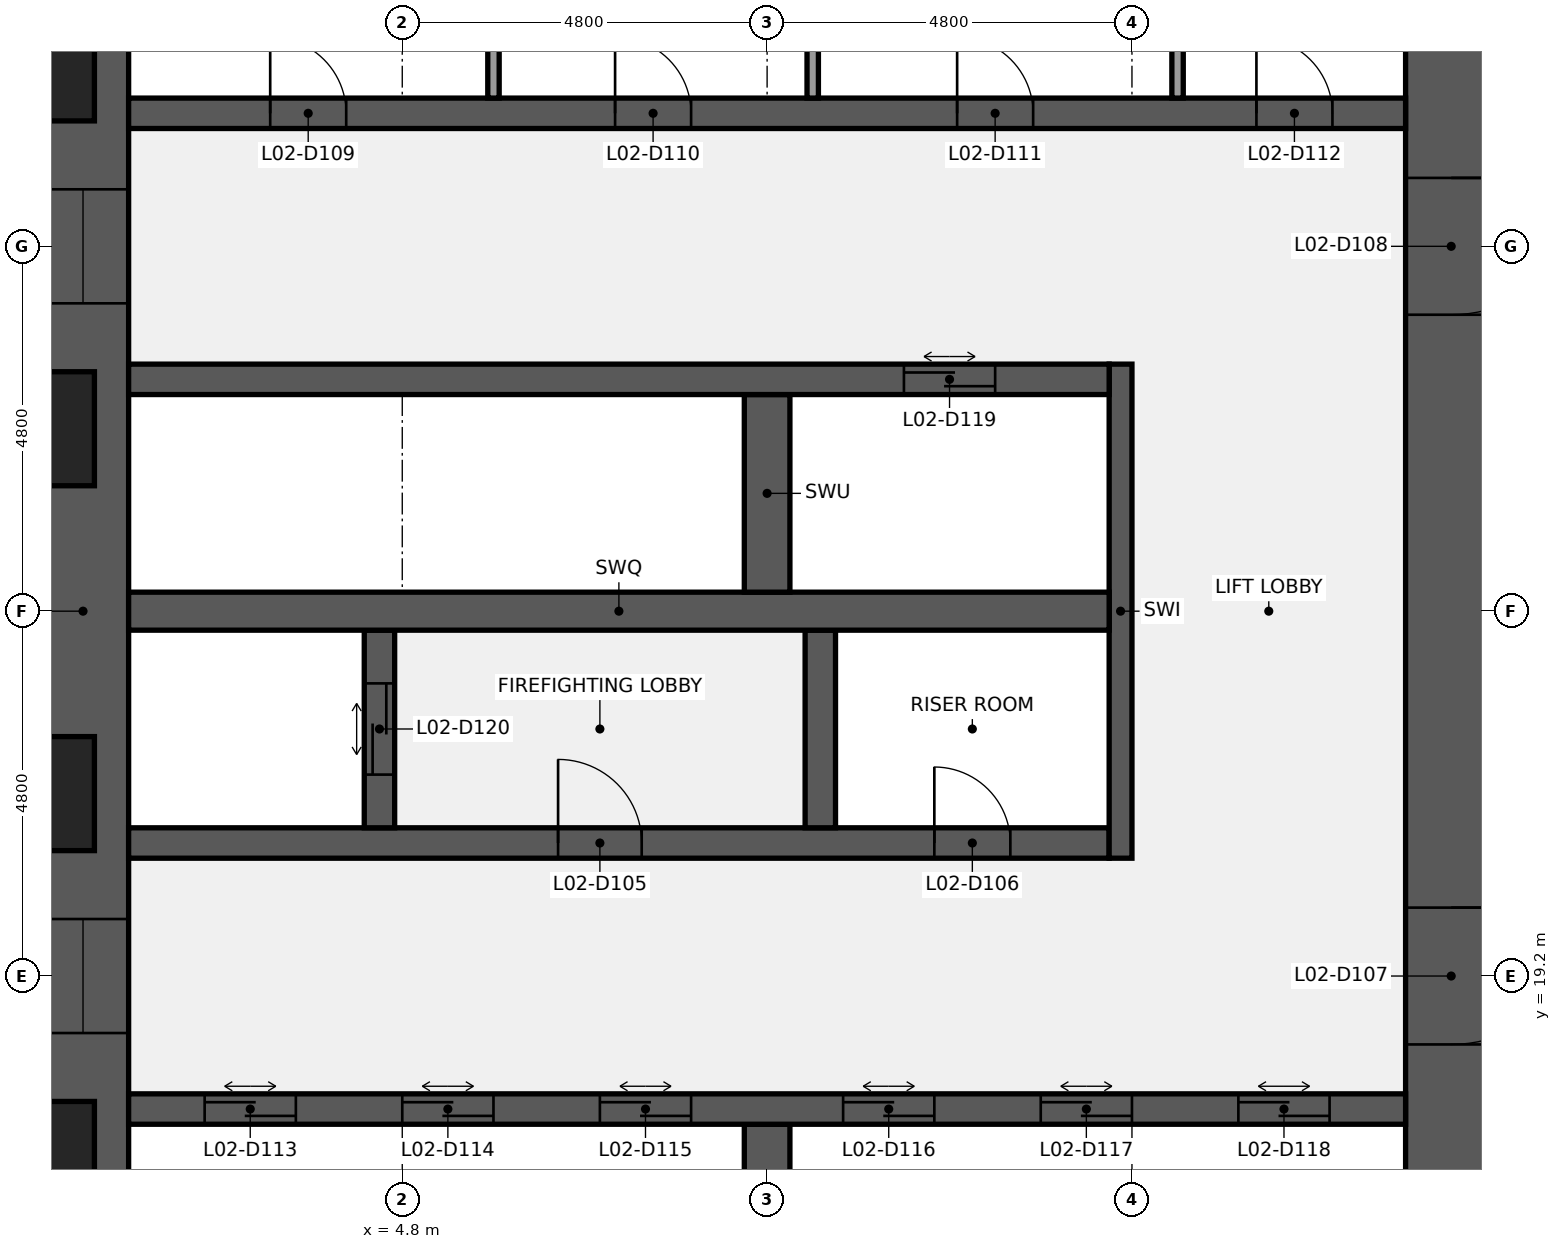
"""IFC4 building model, lengths in metres.
Left out: names, types, materials, properties, quantities, classifications, styles, units other than length and angle.
Written with IfcOpenShell. Run it as: python <this file> out.ifc"""

import sys

from ifc_helpers import new_model, si_unit, direction, frame, frame_2d, origin, place, context, subcontext, project, spatial, rectangle, extrude, element, fill, save


model = new_model("IFC4")
c1 = context("Model", 3, precision=1e-05, world=origin(), true_north=direction((0.0, 1.0)))
c2 = subcontext(c1, "Body", "Model", "MODEL_VIEW")
j1 = project(units=[si_unit("LENGTHUNIT", "METRE"), si_unit("PLANEANGLEUNIT", "RADIAN")], contexts=[c1])
p1 = place(None, origin())
s1 = spatial("IfcSite", under=j1, at=p1, CompositionType="ELEMENT")
p2 = place(p1, origin())
s2 = spatial("IfcBuilding", under=s1, at=p2, CompositionType="ELEMENT")
p3 = place(p2, frame((0.0, 0.0, 17.0)))
s3 = spatial("IfcBuildingStorey", under=s2, at=p3, CompositionType="ELEMENT", Elevation=17.0)
p4 = place(p3, frame((0.6, 9.6, 0.0), z_axis=(0.0, 0.0, 1.0), x_axis=(0.0, 1.0, 0.0)))
e1 = element("IfcWall", 1, at=p4, inside=s3, PredefinedType="SHEAR", context=c2, shape_type="SweptSolid", body=[
    extrude(rectangle(XDim=28.8, YDim=1.2, at=frame_2d((14.4, 0.0))), origin(), (0.0, 0.0, 1.0), 4.24),
])
p5 = place(p4, frame((8.85, 0.0, 0.9)))
e2 = element("IfcOpeningElement", 2, at=p5, cuts=e1, PredefinedType="OPENING", context=c2, shape_type="SweptSolid", body=[
    extrude(rectangle(XDim=1.5, YDim=1.5, at=frame_2d((0.75, 0.75))), frame((0.0, 0.61, 0.0), z_axis=(0.0, -1.0, 0.0), x_axis=(1.0, 0.0, 0.0)), (0.0, 0.0, 1.0), 1.22),
])
p6 = place(p4, frame((18.45, 0.0, 0.9)))
e3 = element("IfcOpeningElement", 3, at=p6, cuts=e1, PredefinedType="OPENING", context=c2, shape_type="SweptSolid", body=[
    extrude(rectangle(XDim=1.5, YDim=1.5, at=frame_2d((0.75, 0.75))), frame((0.0, 0.61, 0.0), z_axis=(0.0, -1.0, 0.0), x_axis=(1.0, 0.0, 0.0)), (0.0, 0.0, 1.0), 1.22),
])
p7 = place(p3, frame((18.6, 38.4, 0.0), z_axis=(0.0, 0.0, 1.0), x_axis=(0.0, -1.0, 0.0)))
e4 = element("IfcWall", 4, at=p7, inside=s3, PredefinedType="SHEAR", context=c2, shape_type="SweptSolid", body=[
    extrude(rectangle(XDim=28.8, YDim=1.2, at=frame_2d((14.4, 0.0))), origin(), (0.0, 0.0, 1.0), 4.24),
])
p8 = place(p7, frame((18.3, 0.0, 0.0)))
e5 = element("IfcOpeningElement", 5, at=p8, cuts=e4, PredefinedType="OPENING", context=c2, shape_type="SweptSolid", body=[
    extrude(rectangle(XDim=1.8, YDim=2.1, at=frame_2d((0.9, 1.05))), frame((0.0, 0.61, 0.0), z_axis=(0.0, -1.0, 0.0), x_axis=(1.0, 0.0, 0.0)), (0.0, 0.0, 1.0), 1.22),
])
p9 = place(p7, frame((8.7, 0.0, 0.0)))
e6 = element("IfcOpeningElement", 6, at=p9, cuts=e4, PredefinedType="OPENING", context=c2, shape_type="SweptSolid", body=[
    extrude(rectangle(XDim=1.8, YDim=2.1, at=frame_2d((0.9, 1.05))), frame((0.0, 0.61, 0.0), z_axis=(0.0, -1.0, 0.0), x_axis=(1.0, 0.0, 0.0)), (0.0, 0.0, 1.0), 1.22),
])
p10 = place(p3, frame((9.6, 14.65, 0.0), z_axis=(0.0, 0.0, 1.0), x_axis=(0.0, 1.0, 0.0)))
e7 = element("IfcWall", 7, at=p10, inside=s3, PredefinedType="SHEAR", context=c2, shape_type="SweptSolid", body=[
    extrude(rectangle(XDim=2.6, YDim=0.6, at=frame_2d((1.3, 0.0))), origin(), (0.0, 0.0, 1.0), 4.24),
])
p11 = place(p3, frame((1.2, 17.45, 0.0), z_axis=(0.0, 0.0, 1.0), x_axis=(1.0, 0.0, 0.0)))
e8 = element("IfcWall", 8, at=p11, inside=s3, PredefinedType="SHEAR", context=c2, shape_type="SweptSolid", body=[
    extrude(rectangle(XDim=16.8, YDim=0.4, at=frame_2d((8.4, 0.0))), origin(), (0.0, 0.0, 1.0), 4.24),
])
p12 = place(p11, frame((1.0, 0.0, 0.0)))
e9 = element("IfcOpeningElement", 9, at=p12, cuts=e8, PredefinedType="OPENING", context=c2, shape_type="SweptSolid", body=[
    extrude(rectangle(XDim=1.2, YDim=2.1, at=frame_2d((0.6, 1.05))), frame((0.0, 0.21, 0.0), z_axis=(0.0, -1.0, 0.0), x_axis=(1.0, 0.0, 0.0)), (0.0, 0.0, 1.0), 0.42),
])
p13 = place(p11, frame((3.6, 0.0, 0.0)))
e10 = element("IfcOpeningElement", 10, at=p13, cuts=e8, PredefinedType="OPENING", context=c2, shape_type="SweptSolid", body=[
    extrude(rectangle(XDim=1.2, YDim=2.1, at=frame_2d((0.6, 1.05))), frame((0.0, 0.21, 0.0), z_axis=(0.0, -1.0, 0.0), x_axis=(1.0, 0.0, 0.0)), (0.0, 0.0, 1.0), 0.42),
])
p14 = place(p11, frame((6.2, 0.0, 0.0)))
e11 = element("IfcOpeningElement", 11, at=p14, cuts=e8, PredefinedType="OPENING", context=c2, shape_type="SweptSolid", body=[
    extrude(rectangle(XDim=1.2, YDim=2.1, at=frame_2d((0.6, 1.05))), frame((0.0, 0.21, 0.0), z_axis=(0.0, -1.0, 0.0), x_axis=(1.0, 0.0, 0.0)), (0.0, 0.0, 1.0), 0.42),
])
p15 = place(p11, frame((9.4, 0.0, 0.0)))
e12 = element("IfcOpeningElement", 12, at=p15, cuts=e8, PredefinedType="OPENING", context=c2, shape_type="SweptSolid", body=[
    extrude(rectangle(XDim=1.2, YDim=2.1, at=frame_2d((0.6, 1.05))), frame((0.0, 0.21, 0.0), z_axis=(0.0, -1.0, 0.0), x_axis=(1.0, 0.0, 0.0)), (0.0, 0.0, 1.0), 0.42),
])
p16 = place(p11, frame((12.0, 0.0, 0.0)))
e13 = element("IfcOpeningElement", 13, at=p16, cuts=e8, PredefinedType="OPENING", context=c2, shape_type="SweptSolid", body=[
    extrude(rectangle(XDim=1.2, YDim=2.1, at=frame_2d((0.6, 1.05))), frame((0.0, 0.21, 0.0), z_axis=(0.0, -1.0, 0.0), x_axis=(1.0, 0.0, 0.0)), (0.0, 0.0, 1.0), 0.42),
])
p17 = place(p11, frame((14.6, 0.0, 0.0)))
e14 = element("IfcOpeningElement", 14, at=p17, cuts=e8, PredefinedType="OPENING", context=c2, shape_type="SweptSolid", body=[
    extrude(rectangle(XDim=1.2, YDim=2.1, at=frame_2d((0.6, 1.05))), frame((0.0, 0.21, 0.0), z_axis=(0.0, -1.0, 0.0), x_axis=(1.0, 0.0, 0.0)), (0.0, 0.0, 1.0), 0.42),
])
p18 = place(p3, frame((1.2, 20.95, 0.0), z_axis=(0.0, 0.0, 1.0), x_axis=(1.0, 0.0, 0.0)))
e15 = element("IfcWall", 15, at=p18, inside=s3, PredefinedType="SHEAR", context=c2, shape_type="SweptSolid", body=[
    extrude(rectangle(XDim=12.9, YDim=0.4, at=frame_2d((6.45, 0.0))), origin(), (0.0, 0.0, 1.0), 4.24),
])
p19 = place(p18, frame((5.65, 0.0, 0.0)))
e16 = element("IfcOpeningElement", 16, at=p19, cuts=e15, PredefinedType="OPENING", context=c2, shape_type="SweptSolid", body=[
    extrude(rectangle(XDim=1.1, YDim=2.1, at=frame_2d((0.55, 1.05))), frame((0.0, 0.21, 0.0), z_axis=(0.0, -1.0, 0.0), x_axis=(1.0, 0.0, 0.0)), (0.0, 0.0, 1.0), 0.42),
])
p20 = place(p18, frame((10.6, 0.0, 0.0)))
e17 = element("IfcOpeningElement", 17, at=p20, cuts=e15, PredefinedType="OPENING", context=c2, shape_type="SweptSolid", body=[
    extrude(rectangle(XDim=1.0, YDim=2.1, at=frame_2d((0.5, 1.05))), frame((0.0, 0.21, 0.0), z_axis=(0.0, -1.0, 0.0), x_axis=(1.0, 0.0, 0.0)), (0.0, 0.0, 1.0), 0.42),
])
p21 = place(p3, frame((14.25, 20.75, 0.0), z_axis=(0.0, 0.0, 1.0), x_axis=(0.0, 1.0, 0.0)))
e18 = element("IfcWall", 18, at=p21, inside=s3, PredefinedType="SHEAR", context=c2, shape_type="SweptSolid", body=[
    extrude(rectangle(XDim=6.5, YDim=0.3, at=frame_2d((3.25, 0.0))), origin(), (0.0, 0.0, 1.0), 4.24),
])
p22 = place(p3, frame((4.5, 21.15, 0.0), z_axis=(0.0, 0.0, 1.0), x_axis=(0.0, 1.0, 0.0)))
e19 = element("IfcWall", 19, at=p22, inside=s3, PredefinedType="SHEAR", context=c2, shape_type="SweptSolid", body=[
    extrude(rectangle(XDim=2.6, YDim=0.4, at=frame_2d((1.3, 0.0))), origin(), (0.0, 0.0, 1.0), 4.24),
])
p23 = place(p22, frame((0.7, 0.0, 0.0)))
e20 = element("IfcOpeningElement", 20, at=p23, cuts=e19, PredefinedType="OPENING", context=c2, shape_type="SweptSolid", body=[
    extrude(rectangle(XDim=1.2, YDim=2.1, at=frame_2d((0.6, 1.05))), frame((0.0, 0.21, 0.0), z_axis=(0.0, -1.0, 0.0), x_axis=(1.0, 0.0, 0.0)), (0.0, 0.0, 1.0), 0.42),
])
p24 = place(p3, frame((10.3, 21.15, 0.0), z_axis=(0.0, 0.0, 1.0), x_axis=(0.0, 1.0, 0.0)))
e21 = element("IfcWall", 21, at=p24, inside=s3, PredefinedType="SHEAR", context=c2, shape_type="SweptSolid", body=[
    extrude(rectangle(XDim=2.6, YDim=0.4, at=frame_2d((1.3, 0.0))), origin(), (0.0, 0.0, 1.0), 4.24),
])
p25 = place(p3, frame((1.2, 24.0, 0.0), z_axis=(0.0, 0.0, 1.0), x_axis=(1.0, 0.0, 0.0)))
e22 = element("IfcWall", 22, at=p25, inside=s3, PredefinedType="SHEAR", context=c2, shape_type="SweptSolid", body=[
    extrude(rectangle(XDim=12.9, YDim=0.5, at=frame_2d((6.45, 0.0))), origin(), (0.0, 0.0, 1.0), 4.24),
])
p26 = place(p3, frame((9.6, 24.25, 0.0), z_axis=(0.0, 0.0, 1.0), x_axis=(0.0, 1.0, 0.0)))
e23 = element("IfcWall", 23, at=p26, inside=s3, PredefinedType="SHEAR", context=c2, shape_type="SweptSolid", body=[
    extrude(rectangle(XDim=2.6, YDim=0.6, at=frame_2d((1.3, 0.0))), origin(), (0.0, 0.0, 1.0), 4.24),
])
p27 = place(p3, frame((1.2, 27.05, 0.0), z_axis=(0.0, 0.0, 1.0), x_axis=(1.0, 0.0, 0.0)))
e24 = element("IfcWall", 24, at=p27, inside=s3, PredefinedType="SHEAR", context=c2, shape_type="SweptSolid", body=[
    extrude(rectangle(XDim=12.9, YDim=0.4, at=frame_2d((6.45, 0.0))), origin(), (0.0, 0.0, 1.0), 4.24),
])
p28 = place(p27, frame((10.2, 0.0, 0.0)))
e25 = element("IfcOpeningElement", 25, at=p28, cuts=e24, PredefinedType="OPENING", context=c2, shape_type="SweptSolid", body=[
    extrude(rectangle(XDim=1.2, YDim=2.1, at=frame_2d((0.6, 1.05))), frame((0.0, 0.21, 0.0), z_axis=(0.0, -1.0, 0.0), x_axis=(1.0, 0.0, 0.0)), (0.0, 0.0, 1.0), 0.42),
])
p29 = place(p3, frame((1.2, 30.55, 0.0), z_axis=(0.0, 0.0, 1.0), x_axis=(1.0, 0.0, 0.0)))
e26 = element("IfcWall", 26, at=p29, inside=s3, PredefinedType="SHEAR", context=c2, shape_type="SweptSolid", body=[
    extrude(rectangle(XDim=16.8, YDim=0.4, at=frame_2d((8.4, 0.0))), origin(), (0.0, 0.0, 1.0), 4.24),
])
p30 = place(p29, frame((1.863, 0.0, 0.0)))
e27 = element("IfcOpeningElement", 27, at=p30, cuts=e26, PredefinedType="OPENING", context=c2, shape_type="SweptSolid", body=[
    extrude(rectangle(XDim=1.0, YDim=2.1, at=frame_2d((0.5, 1.05))), frame((0.0, 0.21, 0.0), z_axis=(0.0, -1.0, 0.0), x_axis=(1.0, 0.0, 0.0)), (0.0, 0.0, 1.0), 0.42),
])
p31 = place(p29, frame((6.4, 0.0, 0.0)))
e28 = element("IfcOpeningElement", 28, at=p31, cuts=e26, PredefinedType="OPENING", context=c2, shape_type="SweptSolid", body=[
    extrude(rectangle(XDim=1.0, YDim=2.1, at=frame_2d((0.5, 1.05))), frame((0.0, 0.21, 0.0), z_axis=(0.0, -1.0, 0.0), x_axis=(1.0, 0.0, 0.0)), (0.0, 0.0, 1.0), 0.42),
])
p32 = place(p29, frame((10.9, 0.0, 0.0)))
e29 = element("IfcOpeningElement", 29, at=p32, cuts=e26, PredefinedType="OPENING", context=c2, shape_type="SweptSolid", body=[
    extrude(rectangle(XDim=1.0, YDim=2.1, at=frame_2d((0.5, 1.05))), frame((0.0, 0.21, 0.0), z_axis=(0.0, -1.0, 0.0), x_axis=(1.0, 0.0, 0.0)), (0.0, 0.0, 1.0), 0.42),
])
p33 = place(p29, frame((14.837, 0.0, 0.0)))
e30 = element("IfcOpeningElement", 30, at=p33, cuts=e26, PredefinedType="OPENING", context=c2, shape_type="SweptSolid", body=[
    extrude(rectangle(XDim=1.0, YDim=2.1, at=frame_2d((0.5, 1.05))), frame((0.0, 0.21, 0.0), z_axis=(0.0, -1.0, 0.0), x_axis=(1.0, 0.0, 0.0)), (0.0, 0.0, 1.0), 0.42),
])
for number, where, z_axis, x_axis in (
    (31, (6.0, 30.75, 0.0), (0.0, 0.0, 1.0), (0.0, 1.0, 0.0)),
    (32, (10.2, 30.75, 0.0), (0.0, 0.0, 1.0), (0.0, 1.0, 0.0)),
    (33, (15.0, 30.75, 0.0), (0.0, 0.0, 1.0), (0.0, 1.0, 0.0)),
):
    element("IfcWall", number, at=place(p3, frame(where, z_axis=z_axis, x_axis=x_axis)), inside=s3, PredefinedType="PARTITIONING", context=c2, shape_type="SweptSolid", body=[
        extrude(rectangle(XDim=2.6, YDim=0.15, at=frame_2d((1.3, 0.0))), origin(), (0.0, 0.0, 1.0), 4.24),
    ])
p34 = place(p19, origin())
e34 = element("IfcDoor", 34, at=p34, inside=s3, OperationType="SINGLE_SWING_LEFT", PredefinedType="DOOR", context=c2, shape_type="SweptSolid", body=[
    extrude(rectangle(XDim=1.1, YDim=2.1, at=frame_2d((0.55, 1.05))), frame((0.0, 0.025, 0.0), z_axis=(0.0, -1.0, 0.0), x_axis=(1.0, 0.0, 0.0)), (0.0, 0.0, 1.0), 0.05),
])
fill(e16, e34)
p35 = place(p20, origin())
e35 = element("IfcDoor", 35, at=p35, inside=s3, OperationType="SINGLE_SWING_LEFT", PredefinedType="DOOR", context=c2, shape_type="SweptSolid", body=[
    extrude(rectangle(XDim=1.0, YDim=2.1, at=frame_2d((0.5, 1.05))), frame((0.0, 0.025, 0.0), z_axis=(0.0, -1.0, 0.0), x_axis=(1.0, 0.0, 0.0)), (0.0, 0.0, 1.0), 0.05),
])
fill(e17, e35)
p36 = place(p8, origin())
e36 = element("IfcDoor", 36, at=p36, inside=s3, OperationType="DOUBLE_DOOR_SINGLE_SWING", PredefinedType="DOOR", context=c2, shape_type="SweptSolid", body=[
    extrude(rectangle(XDim=1.8, YDim=2.1, at=frame_2d((0.9, 1.05))), frame((0.0, 0.025, 0.0), z_axis=(0.0, -1.0, 0.0), x_axis=(1.0, 0.0, 0.0)), (0.0, 0.0, 1.0), 0.05),
])
fill(e5, e36)
p37 = place(p9, origin())
e37 = element("IfcDoor", 37, at=p37, inside=s3, OperationType="DOUBLE_DOOR_SINGLE_SWING", PredefinedType="DOOR", context=c2, shape_type="SweptSolid", body=[
    extrude(rectangle(XDim=1.8, YDim=2.1, at=frame_2d((0.9, 1.05))), frame((0.0, 0.025, 0.0), z_axis=(0.0, -1.0, 0.0), x_axis=(1.0, 0.0, 0.0)), (0.0, 0.0, 1.0), 0.05),
])
fill(e6, e37)
p38 = place(p30, origin())
e38 = element("IfcDoor", 38, at=p38, inside=s3, OperationType="SINGLE_SWING_LEFT", PredefinedType="DOOR", context=c2, shape_type="SweptSolid", body=[
    extrude(rectangle(XDim=1.0, YDim=2.1, at=frame_2d((0.5, 1.05))), frame((0.0, 0.025, 0.0), z_axis=(0.0, -1.0, 0.0), x_axis=(1.0, 0.0, 0.0)), (0.0, 0.0, 1.0), 0.05),
])
fill(e27, e38)
p39 = place(p31, origin())
e39 = element("IfcDoor", 39, at=p39, inside=s3, OperationType="SINGLE_SWING_LEFT", PredefinedType="DOOR", context=c2, shape_type="SweptSolid", body=[
    extrude(rectangle(XDim=1.0, YDim=2.1, at=frame_2d((0.5, 1.05))), frame((0.0, 0.025, 0.0), z_axis=(0.0, -1.0, 0.0), x_axis=(1.0, 0.0, 0.0)), (0.0, 0.0, 1.0), 0.05),
])
fill(e28, e39)
p40 = place(p32, origin())
e40 = element("IfcDoor", 40, at=p40, inside=s3, OperationType="SINGLE_SWING_LEFT", PredefinedType="DOOR", context=c2, shape_type="SweptSolid", body=[
    extrude(rectangle(XDim=1.0, YDim=2.1, at=frame_2d((0.5, 1.05))), frame((0.0, 0.025, 0.0), z_axis=(0.0, -1.0, 0.0), x_axis=(1.0, 0.0, 0.0)), (0.0, 0.0, 1.0), 0.05),
])
fill(e29, e40)
p41 = place(p33, origin())
e41 = element("IfcDoor", 41, at=p41, inside=s3, OperationType="SINGLE_SWING_LEFT", PredefinedType="DOOR", context=c2, shape_type="SweptSolid", body=[
    extrude(rectangle(XDim=1.0, YDim=2.1, at=frame_2d((0.5, 1.05))), frame((0.0, 0.025, 0.0), z_axis=(0.0, -1.0, 0.0), x_axis=(1.0, 0.0, 0.0)), (0.0, 0.0, 1.0), 0.05),
])
fill(e30, e41)
p42 = place(p12, origin())
e42 = element("IfcDoor", 42, at=p42, inside=s3, OperationType="DOUBLE_DOOR_SLIDING", PredefinedType="DOOR", context=c2, shape_type="SweptSolid", body=[
    extrude(rectangle(XDim=1.2, YDim=2.1, at=frame_2d((0.6, 1.05))), frame((0.0, 0.025, 0.0), z_axis=(0.0, -1.0, 0.0), x_axis=(1.0, 0.0, 0.0)), (0.0, 0.0, 1.0), 0.05),
])
fill(e9, e42)
p43 = place(p13, origin())
e43 = element("IfcDoor", 43, at=p43, inside=s3, OperationType="DOUBLE_DOOR_SLIDING", PredefinedType="DOOR", context=c2, shape_type="SweptSolid", body=[
    extrude(rectangle(XDim=1.2, YDim=2.1, at=frame_2d((0.6, 1.05))), frame((0.0, 0.025, 0.0), z_axis=(0.0, -1.0, 0.0), x_axis=(1.0, 0.0, 0.0)), (0.0, 0.0, 1.0), 0.05),
])
fill(e10, e43)
p44 = place(p14, origin())
e44 = element("IfcDoor", 44, at=p44, inside=s3, OperationType="DOUBLE_DOOR_SLIDING", PredefinedType="DOOR", context=c2, shape_type="SweptSolid", body=[
    extrude(rectangle(XDim=1.2, YDim=2.1, at=frame_2d((0.6, 1.05))), frame((0.0, 0.025, 0.0), z_axis=(0.0, -1.0, 0.0), x_axis=(1.0, 0.0, 0.0)), (0.0, 0.0, 1.0), 0.05),
])
fill(e11, e44)
p45 = place(p15, origin())
e45 = element("IfcDoor", 45, at=p45, inside=s3, OperationType="DOUBLE_DOOR_SLIDING", PredefinedType="DOOR", context=c2, shape_type="SweptSolid", body=[
    extrude(rectangle(XDim=1.2, YDim=2.1, at=frame_2d((0.6, 1.05))), frame((0.0, 0.025, 0.0), z_axis=(0.0, -1.0, 0.0), x_axis=(1.0, 0.0, 0.0)), (0.0, 0.0, 1.0), 0.05),
])
fill(e12, e45)
p46 = place(p16, origin())
e46 = element("IfcDoor", 46, at=p46, inside=s3, OperationType="DOUBLE_DOOR_SLIDING", PredefinedType="DOOR", context=c2, shape_type="SweptSolid", body=[
    extrude(rectangle(XDim=1.2, YDim=2.1, at=frame_2d((0.6, 1.05))), frame((0.0, 0.025, 0.0), z_axis=(0.0, -1.0, 0.0), x_axis=(1.0, 0.0, 0.0)), (0.0, 0.0, 1.0), 0.05),
])
fill(e13, e46)
p47 = place(p17, origin())
e47 = element("IfcDoor", 47, at=p47, inside=s3, OperationType="DOUBLE_DOOR_SLIDING", PredefinedType="DOOR", context=c2, shape_type="SweptSolid", body=[
    extrude(rectangle(XDim=1.2, YDim=2.1, at=frame_2d((0.6, 1.05))), frame((0.0, 0.025, 0.0), z_axis=(0.0, -1.0, 0.0), x_axis=(1.0, 0.0, 0.0)), (0.0, 0.0, 1.0), 0.05),
])
fill(e14, e47)
p48 = place(p28, origin())
e48 = element("IfcDoor", 48, at=p48, inside=s3, OperationType="DOUBLE_DOOR_SLIDING", PredefinedType="DOOR", context=c2, shape_type="SweptSolid", body=[
    extrude(rectangle(XDim=1.2, YDim=2.1, at=frame_2d((0.6, 1.05))), frame((0.0, 0.025, 0.0), z_axis=(0.0, -1.0, 0.0), x_axis=(1.0, 0.0, 0.0)), (0.0, 0.0, 1.0), 0.05),
])
fill(e25, e48)
p49 = place(p23, origin())
e49 = element("IfcDoor", 49, at=p49, inside=s3, OperationType="DOUBLE_DOOR_SLIDING", PredefinedType="DOOR", context=c2, shape_type="SweptSolid", body=[
    extrude(rectangle(XDim=1.2, YDim=2.1, at=frame_2d((0.6, 1.05))), frame((0.0, 0.025, 0.0), z_axis=(0.0, -1.0, 0.0), x_axis=(1.0, 0.0, 0.0)), (0.0, 0.0, 1.0), 0.05),
])
fill(e20, e49)
p50 = place(p5, origin())
e50 = element("IfcWindow", 50, at=p50, inside=s3, PartitioningType="SINGLE_PANEL", PredefinedType="WINDOW", context=c2, shape_type="SweptSolid", body=[
    extrude(rectangle(XDim=1.5, YDim=1.5, at=frame_2d((0.75, 0.75))), frame((0.0, 0.03, 0.0), z_axis=(0.0, -1.0, 0.0), x_axis=(1.0, 0.0, 0.0)), (0.0, 0.0, 1.0), 0.06),
])
fill(e2, e50)
p51 = place(p6, origin())
e51 = element("IfcWindow", 51, at=p51, inside=s3, PartitioningType="SINGLE_PANEL", PredefinedType="WINDOW", context=c2, shape_type="SweptSolid", body=[
    extrude(rectangle(XDim=1.5, YDim=1.5, at=frame_2d((0.75, 0.75))), frame((0.0, 0.03, 0.0), z_axis=(0.0, -1.0, 0.0), x_axis=(1.0, 0.0, 0.0)), (0.0, 0.0, 1.0), 0.06),
])
fill(e3, e51)
save(model, sys.argv[1])
